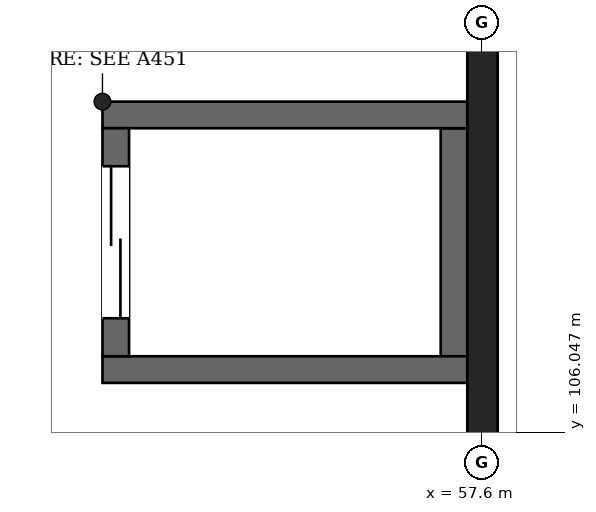
"""IFC4 building model, lengths in metres.
Left out: names, types, materials, properties, quantities, classifications, styles, units other than length and angle.
Written with IfcOpenShell. Run it as: python <this file> out.ifc"""

import sys

from ifc_helpers import new_model, si_unit, direction, frame, frame_2d, origin, place, context, subcontext, project, spatial, rectangle, extrude, element, fill, save


model = new_model("IFC4")
c1 = context("Model", 3, precision=1e-05, world=origin(), true_north=direction((0.0, 1.0)))
c2 = subcontext(c1, "Body", "Model", "MODEL_VIEW")
j1 = project(units=[si_unit("LENGTHUNIT", "METRE"), si_unit("PLANEANGLEUNIT", "RADIAN")], contexts=[c1])
p1 = place(None, origin())
s1 = spatial("IfcSite", under=j1, at=p1, CompositionType="ELEMENT")
p2 = place(p1, origin())
s2 = spatial("IfcBuilding", under=s1, at=p2, CompositionType="ELEMENT")
p3 = place(p2, frame((0.0, 0.0, 6.5)))
s3 = spatial("IfcBuildingStorey", under=s2, at=p3, CompositionType="ELEMENT", Elevation=6.5)
p4 = place(p3, frame((57.6, 94.12, 0.0), z_axis=(0.0, 0.0, 1.0), x_axis=(0.0, 1.0, 0.0)))
e1 = element("IfcWall", 1, at=p4, inside=s3, PredefinedType="SHEAR", context=c2, shape_type="SweptSolid", body=[
    extrude(rectangle(XDim=46.88, YDim=0.4, at=frame_2d((23.44, 0.0))), origin(), (0.0, 0.0, 1.0), 7.7),
])
for number, where, z_axis, x_axis in (
    (2, (52.6, 106.875, 0.0), (0.0, 0.0, 1.0), (1.0, 0.0, 0.0)),
    (3, (52.6, 110.225, 0.0), (0.0, 0.0, 1.0), (1.0, 0.0, 0.0)),
):
    element("IfcWall", number, at=place(p3, frame(where, z_axis=z_axis, x_axis=x_axis)), inside=s3, PredefinedType="SHEAR", context=c2, shape_type="SweptSolid", body=[
        extrude(rectangle(XDim=4.8, YDim=0.35, at=frame_2d((2.4, 0.0))), origin(), (0.0, 0.0, 1.0), 7.7),
    ])
p5 = place(p3, frame((52.775, 107.05, 0.0), z_axis=(0.0, 0.0, 1.0), x_axis=(0.0, 1.0, 0.0)))
e4 = element("IfcWall", 4, at=p5, inside=s3, PredefinedType="SHEAR", context=c2, shape_type="SweptSolid", body=[
    extrude(rectangle(XDim=3.0, YDim=0.35, at=frame_2d((1.5, 0.0))), origin(), (0.0, 0.0, 1.0), 7.7),
])
p6 = place(p5, frame((0.5, 0.0, 0.0)))
e5 = element("IfcOpeningElement", 5, at=p6, cuts=e4, PredefinedType="OPENING", context=c2, shape_type="SweptSolid", body=[
    extrude(rectangle(XDim=2.0, YDim=2.4, at=frame_2d((1.0, 1.2))), frame((0.0, 0.185, 0.0), z_axis=(0.0, -1.0, 0.0), x_axis=(1.0, 0.0, 0.0)), (0.0, 0.0, 1.0), 0.37),
])
p7 = place(p3, frame((57.225, 107.05, 0.0), z_axis=(0.0, 0.0, 1.0), x_axis=(0.0, 1.0, 0.0)))
e6 = element("IfcWall", 6, at=p7, inside=s3, PredefinedType="SHEAR", context=c2, shape_type="SweptSolid", body=[
    extrude(rectangle(XDim=3.0, YDim=0.35, at=frame_2d((1.5, 0.0))), origin(), (0.0, 0.0, 1.0), 7.7),
])
p8 = place(p6, origin())
e7 = element("IfcDoor", 7, at=p8, inside=s3, OperationType="DOUBLE_DOOR_SLIDING", PredefinedType="DOOR", context=c2, shape_type="SweptSolid", body=[
    extrude(rectangle(XDim=2.0, YDim=2.4, at=frame_2d((1.0, 1.2))), frame((0.0, 0.025, 0.0), z_axis=(0.0, -1.0, 0.0), x_axis=(1.0, 0.0, 0.0)), (0.0, 0.0, 1.0), 0.05),
])
fill(e5, e7)
save(model, sys.argv[1])
